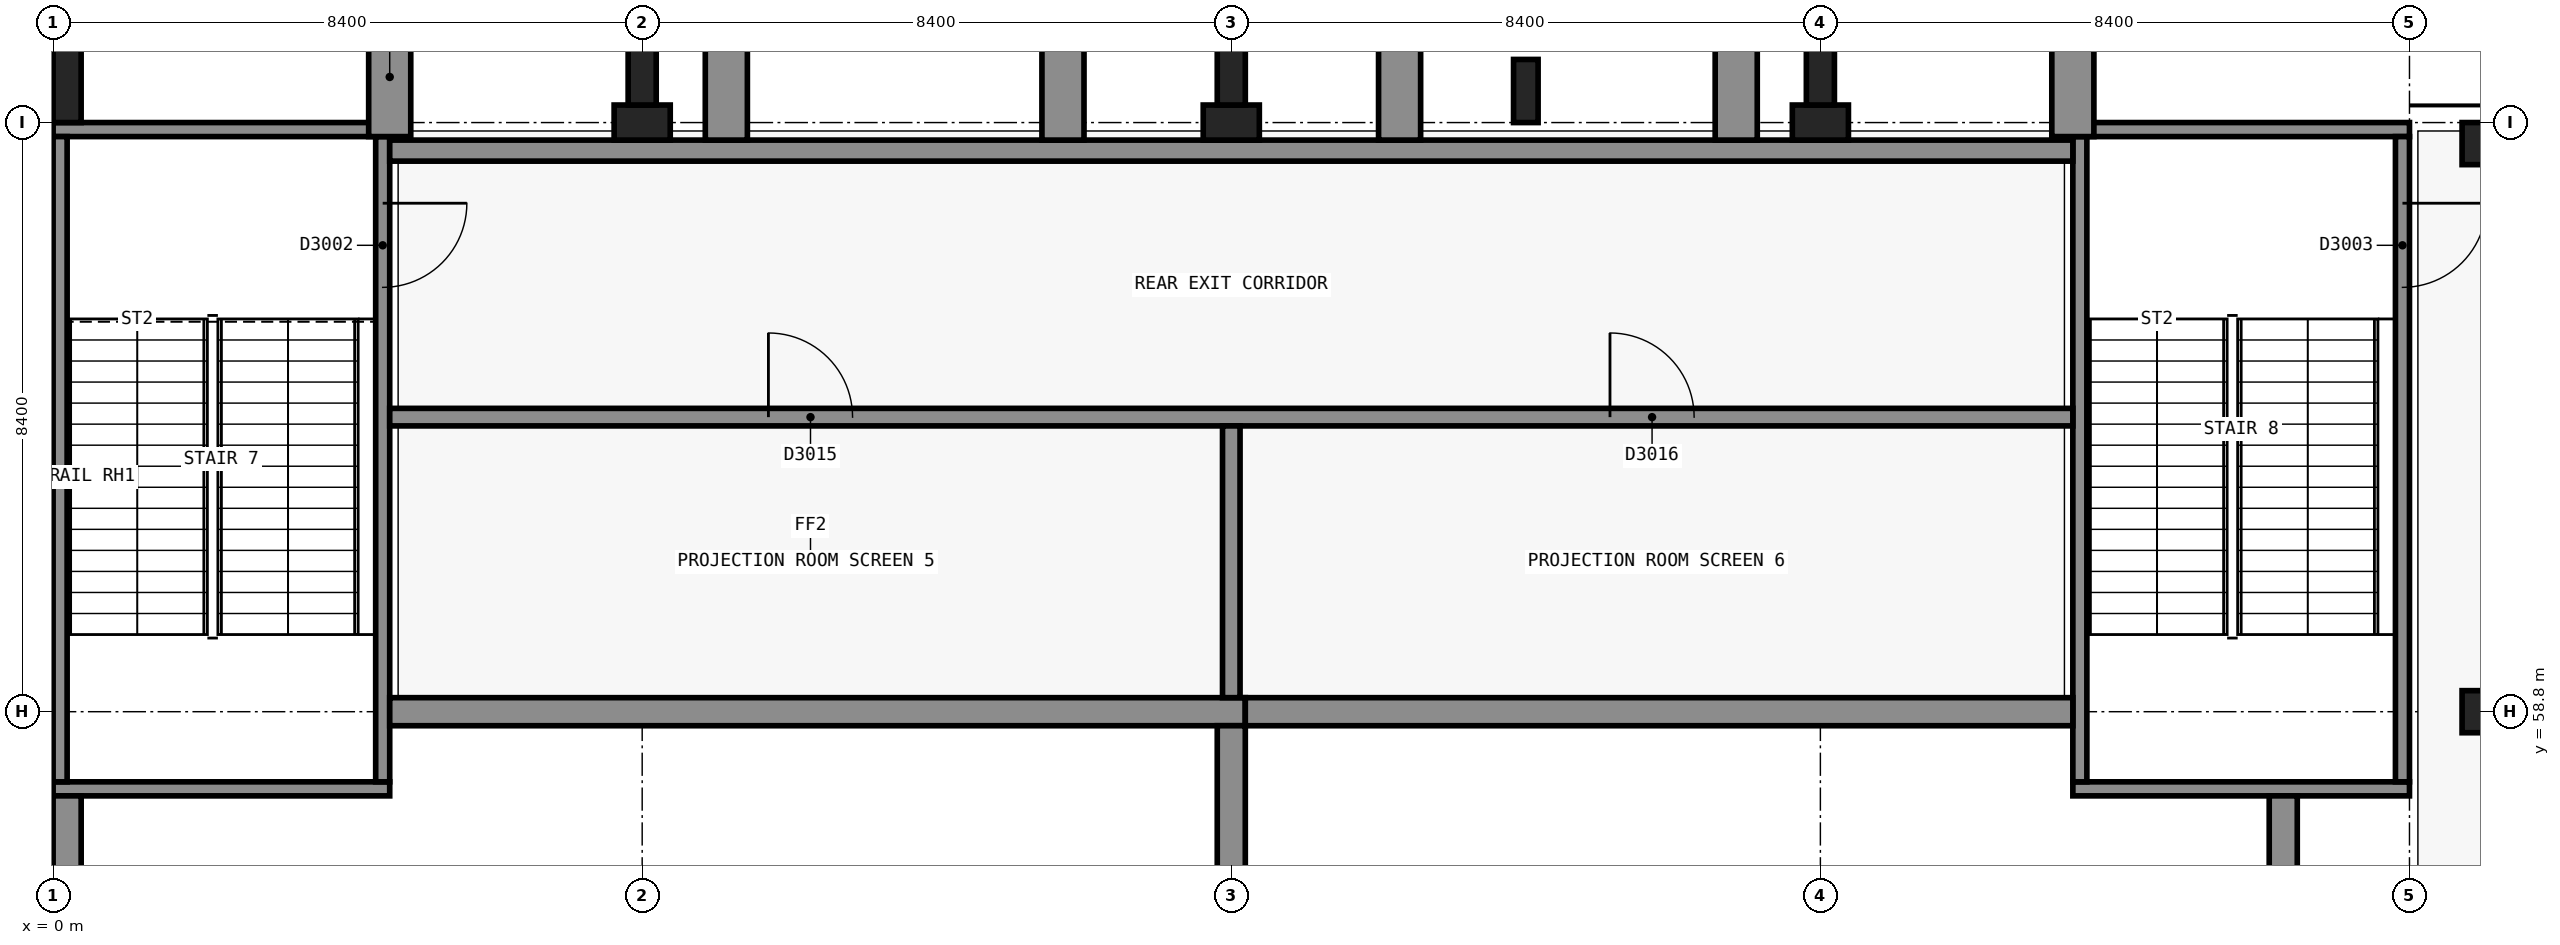
"""IFC4 building model, lengths in metres.
Left out: names, types, materials, properties, quantities, classifications, styles, units other than length and angle.
Written with IfcOpenShell. Run it as: python <this file> out.ifc"""

import sys

from ifc_helpers import new_model, si_unit, direction, frame, frame_2d, origin, origin_2d, place, context, subcontext, project, spatial, rectangle, extrude, element, fill, save


model = new_model("IFC4")
c1 = context("Model", 3, precision=1e-05, world=origin(), true_north=direction((0.0, 1.0)))
c2 = subcontext(c1, "Body", "Model", "MODEL_VIEW")
j1 = project(units=[si_unit("LENGTHUNIT", "METRE"), si_unit("PLANEANGLEUNIT", "RADIAN")], contexts=[c1])
p1 = place(None, origin())
s1 = spatial("IfcSite", under=j1, at=p1, CompositionType="ELEMENT")
p2 = place(p1, origin())
s2 = spatial("IfcBuilding", under=s1, at=p2, CompositionType="ELEMENT")
p3 = place(p2, frame((0.0, 0.0, 15.0)))
s3 = spatial("IfcBuildingStorey", under=s2, at=p3, CompositionType="ELEMENT", Elevation=15.0)
for number, where, z_axis, x_axis in (
    (1, (4.8, 57.7, 0.0), (0.0, 0.0, 1.0), (-1.0, 0.0, 0.0)),
    (2, (0.0, 67.1, 0.0), (0.0, 0.0, 1.0), (1.0, 0.0, 0.0)),
):
    element("IfcWall", number, at=place(p3, frame(where, z_axis=z_axis, x_axis=x_axis)), inside=s3, PredefinedType="SHEAR", context=c2, shape_type="SweptSolid", body=[
        extrude(rectangle(XDim=4.8, YDim=0.2, at=frame_2d((2.4, 0.0))), origin(), (0.0, 0.0, 1.0), 4.8),
    ])
p4 = place(p3, frame((0.1, 57.8, 0.0), z_axis=(0.0, 0.0, 1.0), x_axis=(0.0, 1.0, 0.0)))
e3 = element("IfcWall", 3, at=p4, inside=s3, PredefinedType="SHEAR", context=c2, shape_type="SweptSolid", body=[
    extrude(rectangle(XDim=9.2, YDim=0.2, at=frame_2d((4.6, 0.0))), origin(), (0.0, 0.0, 1.0), 4.8),
])
p5 = place(p3, frame((4.7, 67.0, 0.0), z_axis=(0.0, 0.0, 1.0), x_axis=(0.0, -1.0, 0.0)))
e4 = element("IfcWall", 4, at=p5, inside=s3, PredefinedType="SHEAR", context=c2, shape_type="SweptSolid", body=[
    extrude(rectangle(XDim=9.2, YDim=0.2, at=frame_2d((4.6, 0.0))), origin(), (0.0, 0.0, 1.0), 4.8),
])
p6 = place(p5, frame((0.95, 0.0, 0.0)))
e5 = element("IfcOpeningElement", 5, at=p6, cuts=e4, PredefinedType="OPENING", context=c2, shape_type="SweptSolid", body=[
    extrude(rectangle(XDim=1.2, YDim=2.1, at=frame_2d((0.6, 1.05))), frame((0.0, 0.11, 0.0), z_axis=(0.0, -1.0, 0.0), x_axis=(1.0, 0.0, 0.0)), (0.0, 0.0, 1.0), 0.22),
])
for number, where, z_axis, x_axis in (
    (6, (33.6, 57.7, 0.0), (0.0, 0.0, 1.0), (-1.0, 0.0, 0.0)),
    (7, (28.8, 67.1, 0.0), (0.0, 0.0, 1.0), (1.0, 0.0, 0.0)),
):
    element("IfcWall", number, at=place(p3, frame(where, z_axis=z_axis, x_axis=x_axis)), inside=s3, PredefinedType="SHEAR", context=c2, shape_type="SweptSolid", body=[
        extrude(rectangle(XDim=4.8, YDim=0.2, at=frame_2d((2.4, 0.0))), origin(), (0.0, 0.0, 1.0), 4.8),
    ])
p7 = place(p3, frame((28.9, 57.8, 0.0), z_axis=(0.0, 0.0, 1.0), x_axis=(0.0, 1.0, 0.0)))
e8 = element("IfcWall", 8, at=p7, inside=s3, PredefinedType="SHEAR", context=c2, shape_type="SweptSolid", body=[
    extrude(rectangle(XDim=9.2, YDim=0.2, at=frame_2d((4.6, 0.0))), origin(), (0.0, 0.0, 1.0), 4.8),
])
p8 = place(p3, frame((33.5, 67.0, 0.0), z_axis=(0.0, 0.0, 1.0), x_axis=(0.0, -1.0, 0.0)))
e9 = element("IfcWall", 9, at=p8, inside=s3, PredefinedType="SHEAR", context=c2, shape_type="SweptSolid", body=[
    extrude(rectangle(XDim=9.2, YDim=0.2, at=frame_2d((4.6, 0.0))), origin(), (0.0, 0.0, 1.0), 4.8),
])
p9 = place(p8, frame((0.95, 0.0, 0.0)))
e10 = element("IfcOpeningElement", 10, at=p9, cuts=e9, PredefinedType="OPENING", context=c2, shape_type="SweptSolid", body=[
    extrude(rectangle(XDim=1.2, YDim=2.1, at=frame_2d((0.6, 1.05))), frame((0.0, 0.11, 0.0), z_axis=(0.0, -1.0, 0.0), x_axis=(1.0, 0.0, 0.0)), (0.0, 0.0, 1.0), 0.22),
])
p10 = place(p3, frame((4.8, 58.8, 0.0), z_axis=(0.0, 0.0, 1.0), x_axis=(1.0, 0.0, 0.0)))
e11 = element("IfcWall", 11, at=p10, inside=s3, PredefinedType="SHEAR", context=c2, shape_type="SweptSolid", body=[
    extrude(rectangle(XDim=12.2, YDim=0.4, at=frame_2d((6.1, 0.0))), origin(), (0.0, 0.0, 1.0), 4.8),
])
p11 = place(p3, frame((0.2, 43.2, 0.0), z_axis=(0.0, 0.0, 1.0), x_axis=(0.0, 1.0, 0.0)))
e12 = element("IfcWall", 12, at=p11, inside=s3, PredefinedType="SHEAR", context=c2, shape_type="SweptSolid", body=[
    extrude(rectangle(XDim=14.4, YDim=0.4, at=frame_2d((7.2, 0.0))), origin(), (0.0, 0.0, 1.0), 4.8),
])
p12 = place(p3, frame((16.8, 58.6, 0.0), z_axis=(0.0, 0.0, 1.0), x_axis=(0.0, -1.0, 0.0)))
e13 = element("IfcWall", 13, at=p12, inside=s3, PredefinedType="SHEAR", context=c2, shape_type="SweptSolid", body=[
    extrude(rectangle(XDim=16.4, YDim=0.4, at=frame_2d((8.2, 0.0))), origin(), (0.0, 0.0, 1.0), 4.8),
])
p13 = place(p3, frame((17.0, 58.8, 0.0), z_axis=(0.0, 0.0, 1.0), x_axis=(1.0, 0.0, 0.0)))
e14 = element("IfcWall", 14, at=p13, inside=s3, PredefinedType="SHEAR", context=c2, shape_type="SweptSolid", body=[
    extrude(rectangle(XDim=11.8, YDim=0.4, at=frame_2d((5.9, 0.0))), origin(), (0.0, 0.0, 1.0), 4.8),
])
p14 = place(p3, frame((31.8, 57.6, 0.0), z_axis=(0.0, 0.0, 1.0), x_axis=(0.0, -1.0, 0.0)))
e15 = element("IfcWall", 15, at=p14, inside=s3, PredefinedType="SHEAR", context=c2, shape_type="SweptSolid", body=[
    extrude(rectangle(XDim=15.4, YDim=0.4, at=frame_2d((7.7, 0.0))), origin(), (0.0, 0.0, 1.0), 4.8),
])
for number, where, z_axis, x_axis in (
    (16, (8.4, 67.2, 0.0), (0.0, 0.0, 1.0), (1.0, 0.0, 0.0)),
    (17, (16.8, 67.2, 0.0), (0.0, 0.0, 1.0), (1.0, 0.0, 0.0)),
    (18, (25.2, 67.2, 0.0), (0.0, 0.0, 1.0), (1.0, 0.0, 0.0)),
):
    element("IfcColumn", number, at=place(p3, frame(where, z_axis=z_axis, x_axis=x_axis)), inside=s3, PredefinedType="COLUMN", context=c2, shape_type="SweptSolid", body=[
        extrude(rectangle(XDim=0.8, YDim=0.5, at=origin_2d()), origin(), (0.0, 0.0, 1.0), 4.8),
    ])
for number, where, z_axis, x_axis in (
    (19, (34.65, 58.8, 0.0), (0.0, 0.0, 1.0), (1.0, 0.0, 0.0)),
    (20, (34.65, 66.9, 0.0), (0.0, 0.0, 1.0), (1.0, 0.0, 0.0)),
):
    element("IfcColumn", number, at=place(p3, frame(where, z_axis=z_axis, x_axis=x_axis)), inside=s3, PredefinedType="COLUMN", context=c2, shape_type="SweptSolid", body=[
        extrude(rectangle(XDim=0.6, YDim=0.6, at=origin_2d()), origin(), (0.0, 0.0, 1.0), 4.8),
    ])
p15 = place(p3, frame((4.8, 66.8, 0.0), z_axis=(0.0, 0.0, 1.0), x_axis=(1.0, 0.0, 0.0)))
e21 = element("IfcWall", 21, at=p15, inside=s3, PredefinedType="SOLIDWALL", context=c2, shape_type="SweptSolid", body=[
    extrude(rectangle(XDim=24.0, YDim=0.3, at=frame_2d((12.0, 0.0))), origin(), (0.0, 0.0, 1.0), 4.5),
])
for number, where, z_axis, x_axis in (
    (22, (0.2, 67.8, 0.0), (0.0, 0.0, 1.0), (1.0, 0.0, 0.0)),
    (23, (8.4, 68.05, 0.0), (0.0, 0.0, 1.0), (1.0, 0.0, 0.0)),
    (24, (16.8, 68.05, 0.0), (0.0, 0.0, 1.0), (1.0, 0.0, 0.0)),
):
    element("IfcColumn", number, at=place(p3, frame(where, z_axis=z_axis, x_axis=x_axis)), inside=s3, PredefinedType="PILASTER", context=c2, shape_type="SweptSolid", body=[
        extrude(rectangle(XDim=0.4, YDim=1.2, at=origin_2d()), origin(), (0.0, 0.0, 1.0), 4.8),
    ])
p16 = place(p3, frame((21.0, 67.65, 0.0), z_axis=(0.0, 0.0, 1.0), x_axis=(1.0, 0.0, 0.0)))
e25 = element("IfcColumn", 25, at=p16, inside=s3, PredefinedType="PILASTER", context=c2, shape_type="SweptSolid", body=[
    extrude(rectangle(XDim=0.35, YDim=0.9, at=origin_2d()), origin(), (0.0, 0.0, 1.0), 4.8),
])
p17 = place(p3, frame((25.2, 68.05, 0.0), z_axis=(0.0, 0.0, 1.0), x_axis=(1.0, 0.0, 0.0)))
e26 = element("IfcColumn", 26, at=p17, inside=s3, PredefinedType="PILASTER", context=c2, shape_type="SweptSolid", body=[
    extrude(rectangle(XDim=0.4, YDim=1.2, at=origin_2d()), origin(), (0.0, 0.0, 1.0), 4.8),
])
p18 = place(p3, frame((4.8, 67.0, 0.0), z_axis=(0.0, 0.0, 1.0), x_axis=(0.0, 1.0, 0.0)))
e27 = element("IfcWall", 27, at=p18, inside=s3, PredefinedType="SOLIDWALL", context=c2, shape_type="SweptSolid", body=[
    extrude(rectangle(XDim=1.7, YDim=0.6, at=frame_2d((0.85, 0.0))), origin(), (0.0, 0.0, 1.0), 4.8),
])
for number, where, z_axis, x_axis in (
    (28, (9.6, 66.95, 0.0), (0.0, 0.0, 1.0), (0.0, 1.0, 0.0)),
    (29, (14.4, 66.95, 0.0), (0.0, 0.0, 1.0), (0.0, 1.0, 0.0)),
    (30, (19.2, 66.95, 0.0), (0.0, 0.0, 1.0), (0.0, 1.0, 0.0)),
    (31, (24.0, 66.95, 0.0), (0.0, 0.0, 1.0), (0.0, 1.0, 0.0)),
):
    element("IfcWall", number, at=place(p3, frame(where, z_axis=z_axis, x_axis=x_axis)), inside=s3, PredefinedType="SOLIDWALL", context=c2, shape_type="SweptSolid", body=[
        extrude(rectangle(XDim=1.75, YDim=0.6, at=frame_2d((0.875, 0.0))), origin(), (0.0, 0.0, 1.0), 4.8),
    ])
p19 = place(p3, frame((28.8, 67.0, 0.0), z_axis=(0.0, 0.0, 1.0), x_axis=(0.0, 1.0, 0.0)))
e32 = element("IfcWall", 32, at=p19, inside=s3, PredefinedType="SOLIDWALL", context=c2, shape_type="SweptSolid", body=[
    extrude(rectangle(XDim=1.7, YDim=0.6, at=frame_2d((0.85, 0.0))), origin(), (0.0, 0.0, 1.0), 4.8),
])
p20 = place(p3, frame((4.8, 63.0, 0.0), z_axis=(0.0, 0.0, 1.0), x_axis=(1.0, 0.0, 0.0)))
e33 = element("IfcWall", 33, at=p20, inside=s3, PredefinedType="PARTITIONING", context=c2, shape_type="SweptSolid", body=[
    extrude(rectangle(XDim=24.0, YDim=0.25, at=frame_2d((12.0, 0.0))), origin(), (0.0, 0.0, 1.0), 3.8),
])
p21 = place(p20, frame((5.4, 0.0, 0.0)))
e34 = element("IfcOpeningElement", 34, at=p21, cuts=e33, PredefinedType="OPENING", context=c2, shape_type="SweptSolid", body=[
    extrude(rectangle(XDim=1.2, YDim=2.1, at=frame_2d((0.6, 1.05))), frame((0.0, 0.135, 0.0), z_axis=(0.0, -1.0, 0.0), x_axis=(1.0, 0.0, 0.0)), (0.0, 0.0, 1.0), 0.27),
])
p22 = place(p20, frame((17.4, 0.0, 0.0)))
e35 = element("IfcOpeningElement", 35, at=p22, cuts=e33, PredefinedType="OPENING", context=c2, shape_type="SweptSolid", body=[
    extrude(rectangle(XDim=1.2, YDim=2.1, at=frame_2d((0.6, 1.05))), frame((0.0, 0.135, 0.0), z_axis=(0.0, -1.0, 0.0), x_axis=(1.0, 0.0, 0.0)), (0.0, 0.0, 1.0), 0.27),
])
p23 = place(p3, frame((16.8, 59.0, 0.0), z_axis=(0.0, 0.0, 1.0), x_axis=(0.0, 1.0, 0.0)))
e36 = element("IfcWall", 36, at=p23, inside=s3, PredefinedType="PARTITIONING", context=c2, shape_type="SweptSolid", body=[
    extrude(rectangle(XDim=3.875, YDim=0.25, at=frame_2d((1.938, 0.0))), origin(), (0.0, 0.0, 1.0), 3.8),
])
p24 = place(p6, origin())
e37 = element("IfcDoor", 37, at=p24, inside=s3, OperationType="SINGLE_SWING_RIGHT", PredefinedType="DOOR", context=c2, shape_type="SweptSolid", body=[
    extrude(rectangle(XDim=1.2, YDim=2.1, at=frame_2d((0.6, 1.05))), frame((0.0, 0.025, 0.0), z_axis=(0.0, -1.0, 0.0), x_axis=(1.0, 0.0, 0.0)), (0.0, 0.0, 1.0), 0.05),
])
fill(e5, e37)
p25 = place(p9, origin())
e38 = element("IfcDoor", 38, at=p25, inside=s3, OperationType="SINGLE_SWING_RIGHT", PredefinedType="DOOR", context=c2, shape_type="SweptSolid", body=[
    extrude(rectangle(XDim=1.2, YDim=2.1, at=frame_2d((0.6, 1.05))), frame((0.0, 0.025, 0.0), z_axis=(0.0, -1.0, 0.0), x_axis=(1.0, 0.0, 0.0)), (0.0, 0.0, 1.0), 0.05),
])
fill(e10, e38)
p26 = place(p21, origin())
e39 = element("IfcDoor", 39, at=p26, inside=s3, OperationType="SINGLE_SWING_RIGHT", PredefinedType="DOOR", context=c2, shape_type="SweptSolid", body=[
    extrude(rectangle(XDim=1.2, YDim=2.1, at=frame_2d((0.6, 1.05))), frame((0.0, 0.025, 0.0), z_axis=(0.0, -1.0, 0.0), x_axis=(1.0, 0.0, 0.0)), (0.0, 0.0, 1.0), 0.05),
])
fill(e34, e39)
p27 = place(p22, origin())
e40 = element("IfcDoor", 40, at=p27, inside=s3, OperationType="SINGLE_SWING_RIGHT", PredefinedType="DOOR", context=c2, shape_type="SweptSolid", body=[
    extrude(rectangle(XDim=1.2, YDim=2.1, at=frame_2d((0.6, 1.05))), frame((0.0, 0.025, 0.0), z_axis=(0.0, -1.0, 0.0), x_axis=(1.0, 0.0, 0.0)), (0.0, 0.0, 1.0), 0.05),
])
fill(e35, e40)
save(model, sys.argv[1])
